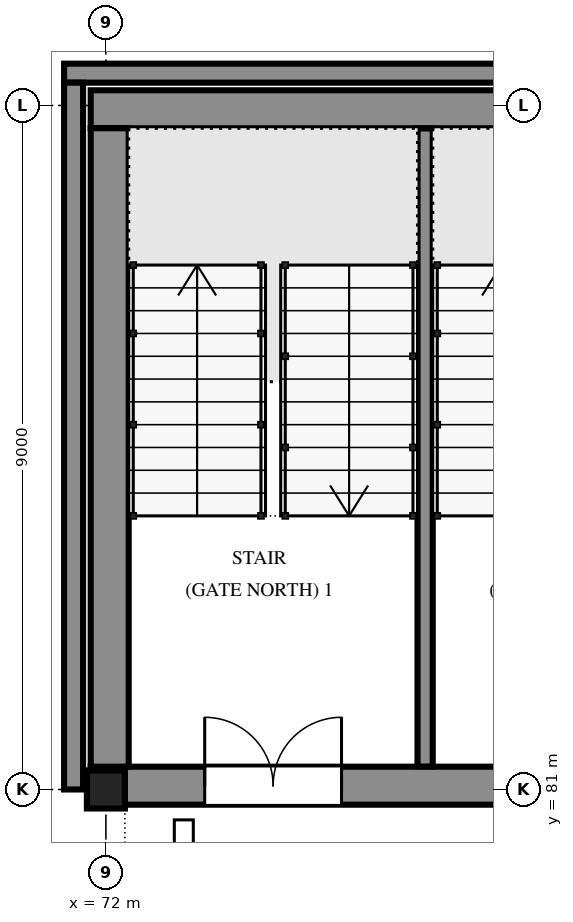
"""IFC4 building model, lengths in metres.
Left out: names, types, materials, properties, quantities, classifications, styles, units other than length and angle.
Written with IfcOpenShell. Run it as: python <this file> out.ifc"""

import sys

from ifc_helpers import new_model, si_unit, direction, frame, frame_2d, origin, origin_2d, place, context, subcontext, project, spatial, polyline, rectangle, hollow_rectangle, outline, extrude, element, fill, save


model = new_model("IFC4")
c1 = context("Model", 3, precision=1e-05, world=origin(), true_north=direction((0.0, 1.0)))
c2 = subcontext(c1, "Body", "Model", "MODEL_VIEW")
j1 = project(units=[si_unit("LENGTHUNIT", "METRE"), si_unit("PLANEANGLEUNIT", "RADIAN")], contexts=[c1])
p1 = place(None, origin())
s1 = spatial("IfcSite", under=j1, at=p1, CompositionType="ELEMENT")
p2 = place(p1, origin())
s2 = spatial("IfcBuilding", under=s1, at=p2, CompositionType="ELEMENT")
p3 = place(p2, frame((0.0, 0.0, 11.7)))
s3 = spatial("IfcBuildingStorey", under=s2, at=p3, CompositionType="ELEMENT", Elevation=11.7)
p4 = place(p3, frame((72.0, 81.0, 0.0), z_axis=(0.0, 0.0, 1.0), x_axis=(1.0, 0.0, 0.0)))
e1 = element("IfcColumn", 1, at=p4, inside=s3, PredefinedType="COLUMN", context=c2, shape_type="SweptSolid", body=[
    extrude(hollow_rectangle(XDim=0.5, YDim=0.5, WallThickness=0.032, at=origin_2d()), origin(), (0.0, 0.0, 1.0), 4.2),
])
p5 = place(p3, frame((71.8, 81.05, 0.0), z_axis=(0.0, 0.0, 1.0), x_axis=(1.0, 0.0, 0.0)))
e2 = element("IfcWall", 2, at=p5, inside=s3, PredefinedType="SOLIDWALL", context=c2, shape_type="SweptSolid", body=[
    extrude(rectangle(XDim=18.4, YDim=0.5, at=frame_2d((9.2, 0.0))), origin(), (0.0, 0.0, 1.0), 4.2),
])
p6 = place(p5, frame((1.5, 0.0, 0.0)))
e3 = element("IfcOpeningElement", 3, at=p6, cuts=e2, PredefinedType="OPENING", context=c2, shape_type="SweptSolid", body=[
    extrude(rectangle(XDim=1.8, YDim=2.1, at=frame_2d((0.9, 1.05))), frame((0.0, 0.26, 0.0), z_axis=(0.0, -1.0, 0.0), x_axis=(1.0, 0.0, 0.0)), (0.0, 0.0, 1.0), 0.52),
])
p7 = place(p5, frame((5.5, 0.0, 0.0)))
e4 = element("IfcOpeningElement", 4, at=p7, cuts=e2, PredefinedType="OPENING", context=c2, shape_type="SweptSolid", body=[
    extrude(rectangle(XDim=1.8, YDim=2.1, at=frame_2d((0.9, 1.05))), frame((0.0, 0.26, 0.0), z_axis=(0.0, -1.0, 0.0), x_axis=(1.0, 0.0, 0.0)), (0.0, 0.0, 1.0), 0.52),
])
p8 = place(p5, frame((9.0, 0.0, 0.0)))
e5 = element("IfcOpeningElement", 5, at=p8, cuts=e2, PredefinedType="OPENING", context=c2, shape_type="SweptSolid", body=[
    extrude(rectangle(XDim=1.8, YDim=2.1, at=frame_2d((0.9, 1.05))), frame((0.0, 0.26, 0.0), z_axis=(0.0, -1.0, 0.0), x_axis=(1.0, 0.0, 0.0)), (0.0, 0.0, 1.0), 0.52),
])
p9 = place(p5, frame((16.15, 0.0, 0.0)))
e6 = element("IfcOpeningElement", 6, at=p9, cuts=e2, PredefinedType="OPENING", context=c2, shape_type="SweptSolid", body=[
    extrude(rectangle(XDim=0.9, YDim=2.1, at=frame_2d((0.45, 1.05))), frame((0.0, 0.26, 0.0), z_axis=(0.0, -1.0, 0.0), x_axis=(1.0, 0.0, 0.0)), (0.0, 0.0, 1.0), 0.52),
])
p10 = place(p3, frame((71.8, 89.95, 0.0), z_axis=(0.0, 0.0, 1.0), x_axis=(1.0, 0.0, 0.0)))
e7 = element("IfcWall", 7, at=p10, inside=s3, PredefinedType="SOLIDWALL", context=c2, shape_type="SweptSolid", body=[
    extrude(rectangle(XDim=18.4, YDim=0.5, at=frame_2d((9.2, 0.0))), origin(), (0.0, 0.0, 1.0), 4.2),
])
p11 = place(p3, frame((72.05, 81.3, 0.0), z_axis=(0.0, 0.0, 1.0), x_axis=(0.0, 1.0, 0.0)))
e8 = element("IfcWall", 8, at=p11, inside=s3, PredefinedType="SOLIDWALL", context=c2, shape_type="SweptSolid", body=[
    extrude(rectangle(XDim=8.4, YDim=0.5, at=frame_2d((4.2, 0.0))), origin(), (0.0, 0.0, 1.0), 4.2),
])
p12 = place(p3, frame((71.45, 90.425, 0.0), z_axis=(0.0, 0.0, 1.0), x_axis=(1.0, 0.0, 0.0)))
e9 = element("IfcWall", 9, at=p12, inside=s3, PredefinedType="SOLIDWALL", context=c2, shape_type="SweptSolid", body=[
    extrude(outline(polyline([(0.0, 0.0), (19.1, 0.0), (19.1, 12.6), (0.0, 12.6), (0.0, 0.0)]), holes=[polyline([(1.308, 2.439), (1.352, 2.546), (1.408, 2.646), (1.475, 2.74), (1.552, 2.826), (1.638, 2.903), (1.732, 2.969), (1.833, 3.025), (1.939, 3.068), (2.05, 3.1), (2.161, 3.068), (2.267, 3.025), (2.368, 2.969), (2.462, 2.903), (2.549, 2.826), (2.625, 2.74), (2.692, 2.646), (2.748, 2.546), (2.792, 2.439), (2.824, 2.329), (2.844, 2.215), (2.85, 2.1), (2.85, 0.6), (1.25, 0.6), (1.25, 2.1), (1.257, 2.215), (1.276, 2.329), (1.308, 2.439)]), polyline([(4.308, 2.439), (4.352, 2.546), (4.408, 2.646), (4.475, 2.74), (4.552, 2.826), (4.638, 2.903), (4.732, 2.969), (4.833, 3.025), (4.939, 3.068), (5.05, 3.1), (5.161, 3.068), (5.267, 3.025), (5.368, 2.969), (5.462, 2.903), (5.549, 2.826), (5.625, 2.74), (5.692, 2.646), (5.748, 2.546), (5.792, 2.439), (5.824, 2.329), (5.844, 2.215), (5.85, 2.1), (5.85, 0.6), (4.25, 0.6), (4.25, 2.1), (4.257, 2.215), (4.276, 2.329), (4.308, 2.439)]), polyline([(7.308, 2.439), (7.352, 2.546), (7.408, 2.646), (7.475, 2.74), (7.552, 2.826), (7.638, 2.903), (7.732, 2.969), (7.833, 3.025), (7.939, 3.068), (8.05, 3.1), (8.161, 3.068), (8.267, 3.025), (8.368, 2.969), (8.462, 2.903), (8.549, 2.826), (8.625, 2.74), (8.692, 2.646), (8.748, 2.546), (8.792, 2.439), (8.824, 2.329), (8.844, 2.215), (8.85, 2.1), (8.85, 0.6), (7.25, 0.6), (7.25, 2.1), (7.257, 2.215), (7.276, 2.329), (7.308, 2.439)]), polyline([(1.308, 6.639), (1.352, 6.746), (1.408, 6.846), (1.475, 6.94), (1.552, 7.026), (1.638, 7.103), (1.732, 7.169), (1.833, 7.225), (1.939, 7.269), (2.05, 7.3), (2.161, 7.269), (2.267, 7.225), (2.368, 7.169), (2.462, 7.103), (2.549, 7.026), (2.625, 6.94), (2.692, 6.846), (2.748, 6.746), (2.792, 6.639), (2.824, 6.529), (2.844, 6.415), (2.85, 6.3), (2.85, 4.8), (1.25, 4.8), (1.25, 6.3), (1.257, 6.415), (1.276, 6.529), (1.308, 6.639)]), polyline([(4.308, 6.639), (4.352, 6.746), (4.408, 6.846), (4.475, 6.94), (4.552, 7.026), (4.638, 7.103), (4.732, 7.169), (4.833, 7.225), (4.939, 7.269), (5.05, 7.3), (5.161, 7.269), (5.267, 7.225), (5.368, 7.169), (5.462, 7.103), (5.549, 7.026), (5.625, 6.94), (5.692, 6.846), (5.748, 6.746), (5.792, 6.639), (5.824, 6.529), (5.844, 6.415), (5.85, 6.3), (5.85, 4.8), (4.25, 4.8), (4.25, 6.3), (4.257, 6.415), (4.276, 6.529), (4.308, 6.639)]), polyline([(7.308, 6.639), (7.352, 6.746), (7.408, 6.846), (7.475, 6.94), (7.552, 7.026), (7.638, 7.103), (7.732, 7.169), (7.833, 7.225), (7.939, 7.269), (8.05, 7.3), (8.161, 7.269), (8.267, 7.225), (8.368, 7.169), (8.462, 7.103), (8.549, 7.026), (8.625, 6.94), (8.692, 6.846), (8.748, 6.746), (8.792, 6.639), (8.824, 6.529), (8.844, 6.415), (8.85, 6.3), (8.85, 4.8), (7.25, 4.8), (7.25, 6.3), (7.257, 6.415), (7.276, 6.529), (7.308, 6.639)]), polyline([(1.308, 10.839), (1.352, 10.946), (1.408, 11.046), (1.475, 11.14), (1.552, 11.226), (1.638, 11.303), (1.732, 11.369), (1.833, 11.425), (1.939, 11.469), (2.05, 11.5), (2.161, 11.469), (2.267, 11.425), (2.368, 11.369), (2.462, 11.303), (2.549, 11.226), (2.625, 11.14), (2.692, 11.046), (2.748, 10.946), (2.792, 10.839), (2.824, 10.729), (2.844, 10.615), (2.85, 10.5), (2.85, 9.0), (1.25, 9.0), (1.25, 10.5), (1.257, 10.615), (1.276, 10.729), (1.308, 10.839)]), polyline([(4.352, 10.946), (4.408, 11.046), (4.475, 11.14), (4.552, 11.226), (4.638, 11.303), (4.732, 11.369), (4.833, 11.425), (4.939, 11.469), (5.05, 11.5), (5.161, 11.469), (5.267, 11.425), (5.368, 11.369), (5.462, 11.303), (5.549, 11.226), (5.625, 11.14), (5.692, 11.046), (5.748, 10.946), (5.792, 10.839), (5.824, 10.729), (5.844, 10.615), (5.85, 10.5), (5.85, 9.0), (4.25, 9.0), (4.25, 10.5), (4.257, 10.615), (4.276, 10.729), (4.308, 10.839), (4.352, 10.946)]), polyline([(7.352, 10.946), (7.408, 11.046), (7.475, 11.14), (7.552, 11.226), (7.638, 11.303), (7.732, 11.369), (7.833, 11.425), (7.939, 11.469), (8.05, 11.5), (8.161, 11.469), (8.267, 11.425), (8.368, 11.369), (8.462, 11.303), (8.549, 11.226), (8.625, 11.14), (8.692, 11.046), (8.748, 10.946), (8.792, 10.839), (8.824, 10.729), (8.844, 10.615), (8.85, 10.5), (8.85, 9.0), (7.25, 9.0), (7.25, 10.5), (7.257, 10.615), (7.276, 10.729), (7.308, 10.839), (7.352, 10.946)]), polyline([(10.308, 2.439), (10.352, 2.546), (10.408, 2.646), (10.475, 2.74), (10.552, 2.826), (10.638, 2.903), (10.732, 2.969), (10.833, 3.025), (10.939, 3.068), (11.05, 3.1), (11.161, 3.068), (11.267, 3.025), (11.368, 2.969), (11.462, 2.903), (11.549, 2.826), (11.625, 2.74), (11.692, 2.646), (11.748, 2.546), (11.792, 2.439), (11.824, 2.329), (11.844, 2.215), (11.85, 2.1), (11.85, 0.6), (10.25, 0.6), (10.25, 2.1), (10.257, 2.215), (10.276, 2.329), (10.308, 2.439)]), polyline([(13.308, 2.439), (13.352, 2.546), (13.408, 2.646), (13.475, 2.74), (13.552, 2.826), (13.638, 2.903), (13.732, 2.969), (13.833, 3.025), (13.939, 3.068), (14.05, 3.1), (14.161, 3.068), (14.267, 3.025), (14.368, 2.969), (14.462, 2.903), (14.549, 2.826), (14.625, 2.74), (14.692, 2.646), (14.748, 2.546), (14.792, 2.439), (14.824, 2.329), (14.844, 2.215), (14.85, 2.1), (14.85, 0.6), (13.25, 0.6), (13.25, 2.1), (13.257, 2.215), (13.276, 2.329), (13.308, 2.439)]), polyline([(16.308, 2.439), (16.352, 2.546), (16.408, 2.646), (16.475, 2.74), (16.552, 2.826), (16.638, 2.903), (16.732, 2.969), (16.833, 3.025), (16.939, 3.068), (17.05, 3.1), (17.161, 3.068), (17.267, 3.025), (17.368, 2.969), (17.462, 2.903), (17.549, 2.826), (17.625, 2.74), (17.692, 2.646), (17.748, 2.546), (17.792, 2.439), (17.824, 2.329), (17.844, 2.215), (17.85, 2.1), (17.85, 0.6), (16.25, 0.6), (16.25, 2.1), (16.257, 2.215), (16.276, 2.329), (16.308, 2.439)]), polyline([(10.308, 6.639), (10.352, 6.746), (10.408, 6.846), (10.475, 6.94), (10.552, 7.026), (10.638, 7.103), (10.732, 7.169), (10.833, 7.225), (10.939, 7.269), (11.05, 7.3), (11.161, 7.269), (11.267, 7.225), (11.368, 7.169), (11.462, 7.103), (11.549, 7.026), (11.625, 6.94), (11.692, 6.846), (11.748, 6.746), (11.792, 6.639), (11.824, 6.529), (11.844, 6.415), (11.85, 6.3), (11.85, 4.8), (10.25, 4.8), (10.25, 6.3), (10.257, 6.415), (10.276, 6.529), (10.308, 6.639)]), polyline([(13.308, 6.639), (13.352, 6.746), (13.408, 6.846), (13.475, 6.94), (13.552, 7.026), (13.638, 7.103), (13.732, 7.169), (13.833, 7.225), (13.939, 7.269), (14.05, 7.3), (14.161, 7.269), (14.267, 7.225), (14.368, 7.169), (14.462, 7.103), (14.549, 7.026), (14.625, 6.94), (14.692, 6.846), (14.748, 6.746), (14.792, 6.639), (14.824, 6.529), (14.844, 6.415), (14.85, 6.3), (14.85, 4.8), (13.25, 4.8), (13.25, 6.3), (13.257, 6.415), (13.276, 6.529), (13.308, 6.639)]), polyline([(16.308, 6.639), (16.352, 6.746), (16.408, 6.846), (16.475, 6.94), (16.552, 7.026), (16.638, 7.103), (16.732, 7.169), (16.833, 7.225), (16.939, 7.269), (17.05, 7.3), (17.161, 7.269), (17.267, 7.225), (17.368, 7.169), (17.462, 7.103), (17.549, 7.026), (17.625, 6.94), (17.692, 6.846), (17.748, 6.746), (17.792, 6.639), (17.824, 6.529), (17.844, 6.415), (17.85, 6.3), (17.85, 4.8), (16.25, 4.8), (16.25, 6.3), (16.257, 6.415), (16.276, 6.529), (16.308, 6.639)]), polyline([(10.308, 10.839), (10.352, 10.946), (10.408, 11.046), (10.475, 11.14), (10.552, 11.226), (10.638, 11.303), (10.732, 11.369), (10.833, 11.425), (10.939, 11.469), (11.05, 11.5), (11.161, 11.469), (11.267, 11.425), (11.368, 11.369), (11.462, 11.303), (11.549, 11.226), (11.625, 11.14), (11.692, 11.046), (11.748, 10.946), (11.792, 10.839), (11.824, 10.729), (11.844, 10.615), (11.85, 10.5), (11.85, 9.0), (10.25, 9.0), (10.25, 10.5), (10.257, 10.615), (10.276, 10.729), (10.308, 10.839)]), polyline([(13.352, 10.946), (13.408, 11.046), (13.475, 11.14), (13.552, 11.226), (13.638, 11.303), (13.732, 11.369), (13.833, 11.425), (13.939, 11.469), (14.05, 11.5), (14.161, 11.469), (14.267, 11.425), (14.368, 11.369), (14.462, 11.303), (14.549, 11.226), (14.625, 11.14), (14.692, 11.046), (14.748, 10.946), (14.792, 10.839), (14.824, 10.729), (14.844, 10.615), (14.85, 10.5), (14.85, 9.0), (13.25, 9.0), (13.25, 10.5), (13.257, 10.615), (13.276, 10.729), (13.308, 10.839), (13.352, 10.946)]), polyline([(16.352, 10.946), (16.408, 11.046), (16.475, 11.14), (16.552, 11.226), (16.638, 11.303), (16.732, 11.369), (16.833, 11.425), (16.939, 11.469), (17.05, 11.5), (17.161, 11.469), (17.267, 11.425), (17.368, 11.369), (17.462, 11.303), (17.549, 11.226), (17.625, 11.14), (17.692, 11.046), (17.748, 10.946), (17.792, 10.839), (17.824, 10.729), (17.844, 10.615), (17.85, 10.5), (17.85, 9.0), (16.25, 9.0), (16.25, 10.5), (16.257, 10.615), (16.276, 10.729), (16.308, 10.839), (16.352, 10.946)])]), frame((0.0, 0.125, 0.0), z_axis=(0.0, -1.0, 0.0), x_axis=(1.0, 0.0, 0.0)), (0.0, 0.0, 1.0), 0.25),
])
p13 = place(p3, frame((71.575, 81.0, 0.0), z_axis=(0.0, 0.0, 1.0), x_axis=(0.0, 1.0, 0.0)))
e10 = element("IfcWall", 10, at=p13, inside=s3, PredefinedType="SOLIDWALL", context=c2, shape_type="SweptSolid", body=[
    extrude(outline(polyline([(0.0, 0.0), (9.3, 0.0), (9.3, 12.6), (0.0, 12.6), (0.0, 0.0)]), holes=[polyline([(2.356, 2.215), (2.376, 2.329), (2.408, 2.439), (2.452, 2.546), (2.508, 2.646), (2.575, 2.74), (2.652, 2.826), (2.738, 2.903), (2.832, 2.969), (2.933, 3.025), (3.039, 3.068), (3.15, 3.1), (3.261, 3.068), (3.367, 3.025), (3.468, 2.969), (3.562, 2.903), (3.648, 2.826), (3.725, 2.74), (3.792, 2.646), (3.848, 2.546), (3.892, 2.439), (3.924, 2.329), (3.944, 2.215), (3.95, 2.1), (3.95, 0.6), (2.35, 0.6), (2.35, 2.1), (2.356, 2.215)]), polyline([(5.376, 2.329), (5.408, 2.439), (5.452, 2.546), (5.508, 2.646), (5.575, 2.74), (5.652, 2.826), (5.738, 2.903), (5.832, 2.969), (5.933, 3.025), (6.039, 3.068), (6.15, 3.1), (6.261, 3.068), (6.367, 3.025), (6.468, 2.969), (6.562, 2.903), (6.648, 2.826), (6.725, 2.74), (6.792, 2.646), (6.848, 2.546), (6.892, 2.439), (6.924, 2.329), (6.944, 2.215), (6.95, 2.1), (6.95, 0.6), (5.35, 0.6), (5.35, 2.1), (5.356, 2.215), (5.376, 2.329)]), polyline([(2.376, 6.529), (2.408, 6.639), (2.452, 6.746), (2.508, 6.846), (2.575, 6.94), (2.652, 7.026), (2.738, 7.103), (2.832, 7.169), (2.933, 7.225), (3.039, 7.269), (3.15, 7.3), (3.261, 7.269), (3.367, 7.225), (3.468, 7.169), (3.562, 7.103), (3.648, 7.026), (3.725, 6.94), (3.792, 6.846), (3.848, 6.746), (3.892, 6.639), (3.924, 6.529), (3.944, 6.415), (3.95, 6.3), (3.95, 4.8), (2.35, 4.8), (2.35, 6.3), (2.356, 6.415), (2.376, 6.529)]), polyline([(5.356, 6.415), (5.376, 6.529), (5.408, 6.639), (5.452, 6.746), (5.508, 6.846), (5.575, 6.94), (5.652, 7.026), (5.738, 7.103), (5.832, 7.169), (5.933, 7.225), (6.039, 7.269), (6.15, 7.3), (6.261, 7.269), (6.367, 7.225), (6.468, 7.169), (6.562, 7.103), (6.648, 7.026), (6.725, 6.94), (6.792, 6.846), (6.848, 6.746), (6.892, 6.639), (6.924, 6.529), (6.944, 6.415), (6.95, 6.3), (6.95, 4.8), (5.35, 4.8), (5.35, 6.3), (5.356, 6.415)]), polyline([(2.376, 10.729), (2.408, 10.839), (2.452, 10.946), (2.508, 11.046), (2.575, 11.14), (2.652, 11.226), (2.738, 11.303), (2.832, 11.369), (2.933, 11.425), (3.039, 11.469), (3.15, 11.5), (3.261, 11.469), (3.367, 11.425), (3.468, 11.369), (3.562, 11.303), (3.648, 11.226), (3.725, 11.14), (3.792, 11.046), (3.848, 10.946), (3.892, 10.839), (3.924, 10.729), (3.944, 10.615), (3.95, 10.5), (3.95, 9.0), (2.35, 9.0), (2.35, 10.5), (2.356, 10.615), (2.376, 10.729)]), polyline([(5.376, 10.729), (5.408, 10.839), (5.452, 10.946), (5.508, 11.046), (5.575, 11.14), (5.652, 11.226), (5.738, 11.303), (5.832, 11.369), (5.933, 11.425), (6.039, 11.469), (6.15, 11.5), (6.261, 11.469), (6.367, 11.425), (6.468, 11.369), (6.562, 11.303), (6.648, 11.226), (6.725, 11.14), (6.792, 11.046), (6.848, 10.946), (6.892, 10.839), (6.924, 10.729), (6.944, 10.615), (6.95, 10.5), (6.95, 9.0), (5.35, 9.0), (5.35, 10.5), (5.356, 10.615), (5.376, 10.729)])]), frame((0.0, 0.125, 0.0), z_axis=(0.0, -1.0, 0.0), x_axis=(1.0, 0.0, 0.0)), (0.0, 0.0, 1.0), 0.25),
])
p14 = place(p3, frame((63.2, 81.125, 0.0), z_axis=(0.0, 0.0, 1.0), x_axis=(1.0, 0.0, 0.0)))
e11 = element("IfcWall", 11, at=p14, inside=s3, PredefinedType="PARAPET", context=c2, shape_type="SweptSolid", body=[
    extrude(outline(polyline([(0.0, 0.0), (8.55, 0.0), (8.55, 1.7), (7.65, 1.7), (7.65, 0.9), (7.02, 0.9), (7.02, 1.7), (6.12, 1.7), (6.12, 0.9), (5.49, 0.9), (5.49, 1.7), (4.59, 1.7), (4.59, 0.9), (3.96, 0.9), (3.96, 1.7), (3.06, 1.7), (3.06, 0.9), (2.43, 0.9), (2.43, 1.7), (1.53, 1.7), (1.53, 0.9), (0.9, 0.9), (0.9, 1.7), (0.0, 1.7), (0.0, 0.0)])), frame((0.0, 0.1, 0.0), z_axis=(0.0, -1.0, 0.0), x_axis=(1.0, 0.0, 0.0)), (0.0, 0.0, 1.0), 0.2),
])
p15 = place(p3, frame((76.2, 81.302, -0.15), z_axis=(0.0, 0.0, 1.0), x_axis=(0.0, 1.0, 0.0)))
e12 = element("IfcWall", 12, at=p15, inside=s3, PredefinedType="SOLIDWALL", context=c2, shape_type="SweptSolid", body=[
    extrude(rectangle(XDim=8.396, YDim=0.2, at=frame_2d((4.198, 0.0))), origin(), (0.0, 0.0, 1.0), 3.666),
])
p16 = place(p6, origin())
e13 = element("IfcDoor", 13, at=p16, inside=s3, OperationType="DOUBLE_DOOR_SINGLE_SWING", PredefinedType="DOOR", context=c2, shape_type="SweptSolid", body=[
    extrude(outline(polyline([(0.0, 0.0), (0.07, 0.0), (0.07, 2.03), (1.73, 2.03), (1.73, 0.0), (1.8, 0.0), (1.8, 2.1), (0.0, 2.1), (0.0, 0.0)])), frame((0.0, 0.025, 0.0), z_axis=(0.0, -1.0, 0.0), x_axis=(1.0, 0.0, 0.0)), (0.0, 0.0, 1.0), 0.05),
    extrude(outline(polyline([(0.074, 0.01), (0.897, 0.01), (0.897, 2.026), (0.074, 2.026), (0.074, 0.01)]), holes=[polyline([(0.194, 0.16), (0.777, 0.16), (0.777, 1.01), (0.194, 1.01), (0.194, 0.16)]), polyline([(0.335, 1.16), (0.635, 1.16), (0.635, 1.76), (0.335, 1.76), (0.335, 1.16)])]), frame((0.0, 0.017, 0.0), z_axis=(0.0, -1.0, 0.0), x_axis=(1.0, 0.0, 0.0)), (0.0, 0.0, 1.0), 0.035),
    extrude(rectangle(XDim=0.583, YDim=0.85, at=frame_2d((0.485, 0.585))), frame((0.0, 0.009, 0.0), z_axis=(0.0, -1.0, 0.0), x_axis=(1.0, 0.0, 0.0)), (0.0, 0.0, 1.0), 0.017),
    extrude(rectangle(XDim=0.3, YDim=0.6, at=frame_2d((0.485, 1.46))), frame((0.0, 0.006, 0.0), z_axis=(0.0, -1.0, 0.0), x_axis=(1.0, 0.0, 0.0)), (0.0, 0.0, 1.0), 0.012),
    extrude(outline(polyline([(0.903, 0.01), (1.726, 0.01), (1.726, 2.026), (0.903, 2.026), (0.903, 0.01)]), holes=[polyline([(1.023, 0.16), (1.606, 0.16), (1.606, 1.01), (1.023, 1.01), (1.023, 0.16)]), polyline([(1.165, 1.16), (1.465, 1.16), (1.465, 1.76), (1.165, 1.76), (1.165, 1.16)])]), frame((0.0, 0.017, 0.0), z_axis=(0.0, -1.0, 0.0), x_axis=(1.0, 0.0, 0.0)), (0.0, 0.0, 1.0), 0.035),
    extrude(rectangle(XDim=0.583, YDim=0.85, at=frame_2d((1.314, 0.585))), frame((0.0, 0.009, 0.0), z_axis=(0.0, -1.0, 0.0), x_axis=(1.0, 0.0, 0.0)), (0.0, 0.0, 1.0), 0.017),
    extrude(rectangle(XDim=0.3, YDim=0.6, at=frame_2d((1.314, 1.46))), frame((0.0, 0.006, 0.0), z_axis=(0.0, -1.0, 0.0), x_axis=(1.0, 0.0, 0.0)), (0.0, 0.0, 1.0), 0.012),
])
fill(e3, e13)
save(model, sys.argv[1])
